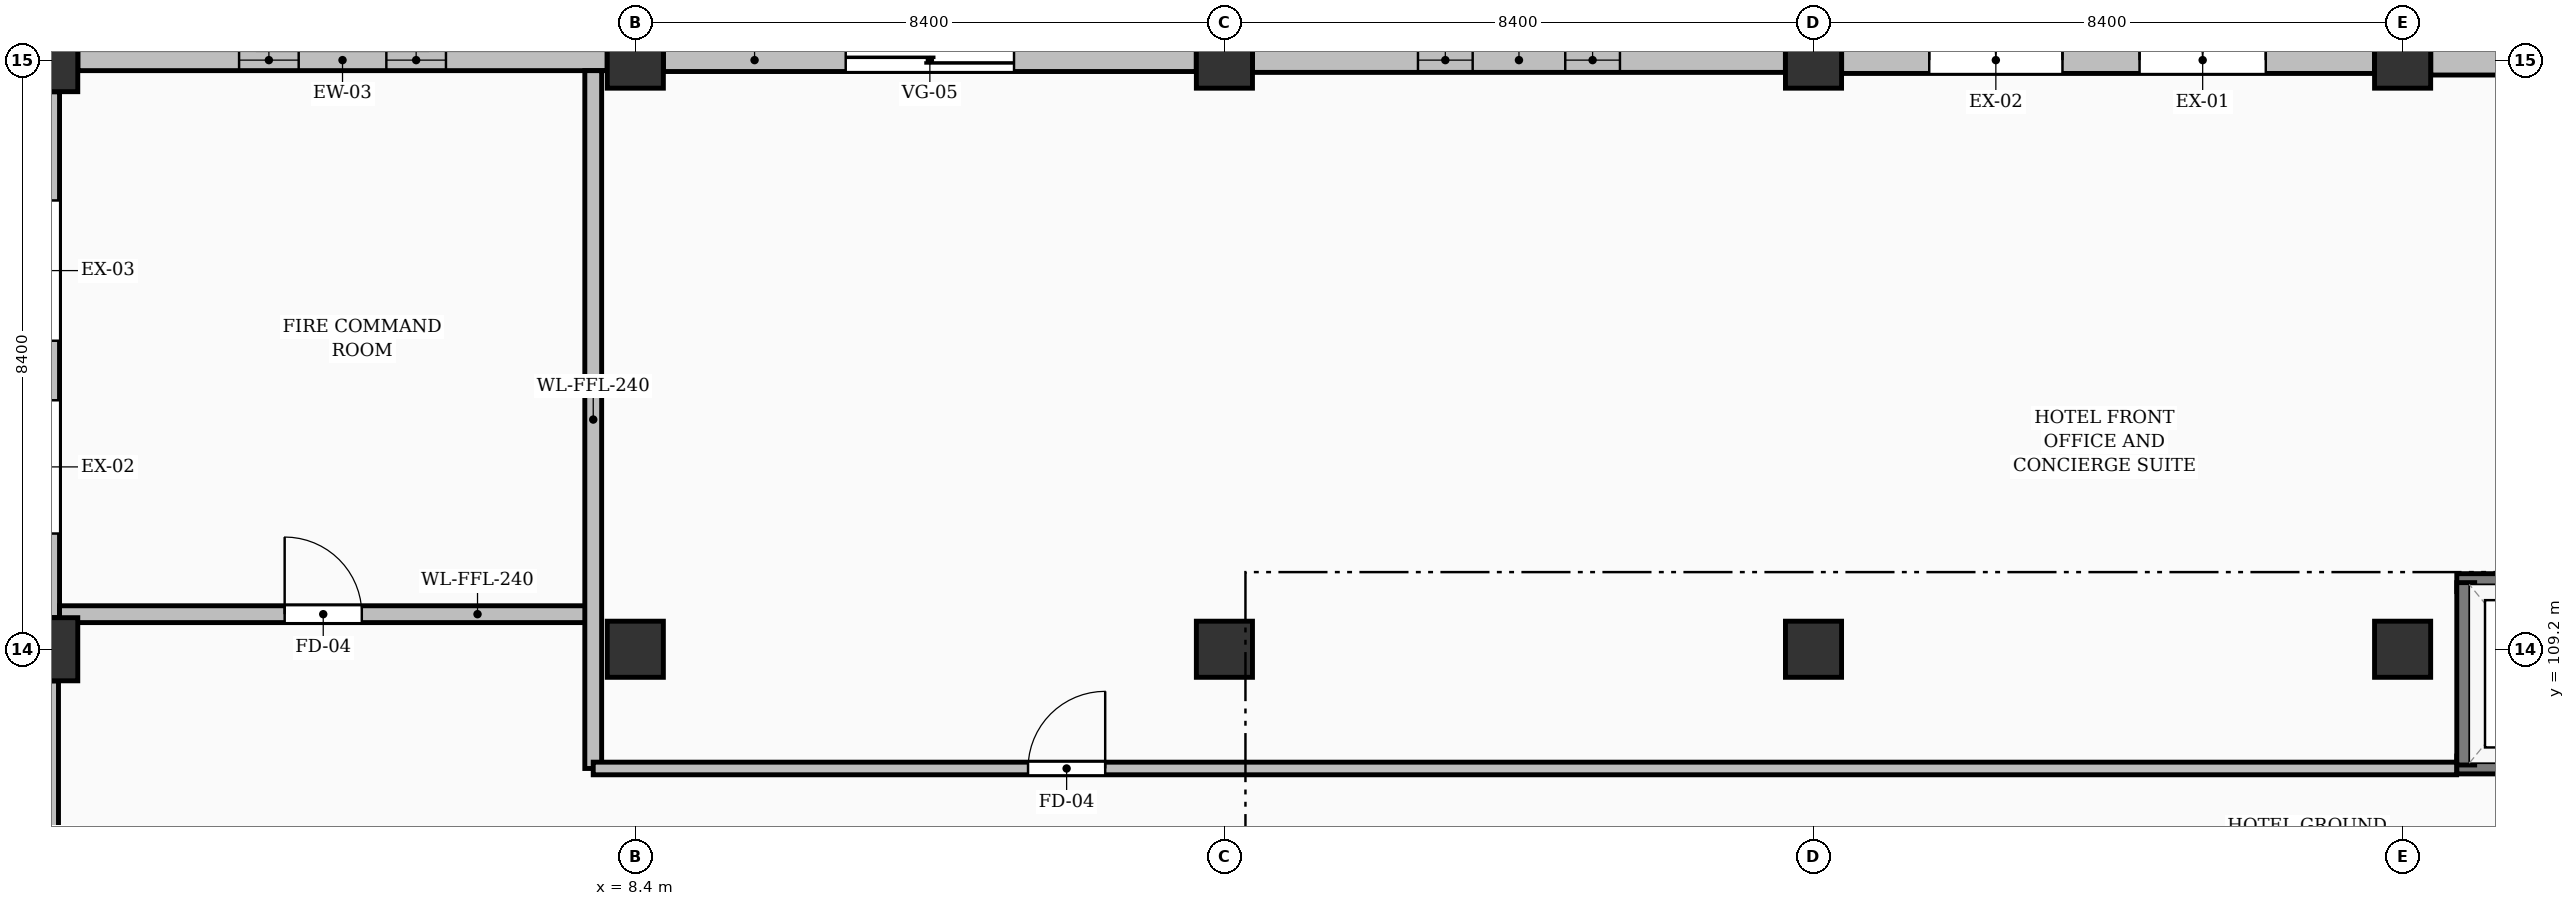
"""IFC4 building model, lengths in metres.
Left out: names, types, materials, properties, quantities, classifications, styles, units other than length and angle.
Written with IfcOpenShell. Run it as: python <this file> out.ifc"""

import sys

from ifc_helpers import new_model, si_unit, direction, frame, frame_2d, origin, origin_2d, place, context, subcontext, project, spatial, rectangle, extrude, element, fill, save


model = new_model("IFC4")
c1 = context("Model", 3, precision=1e-05, world=origin(), true_north=direction((0.0, 1.0)))
c2 = subcontext(c1, "Body", "Model", "MODEL_VIEW")
j1 = project(units=[si_unit("LENGTHUNIT", "METRE"), si_unit("PLANEANGLEUNIT", "RADIAN")], contexts=[c1])
p1 = place(None, origin())
s1 = spatial("IfcSite", under=j1, at=p1, CompositionType="ELEMENT")
p2 = place(p1, origin())
s2 = spatial("IfcBuilding", under=s1, at=p2, CompositionType="ELEMENT")
p3 = place(p2, origin())
s3 = spatial("IfcBuildingStorey", under=s2, at=p3, CompositionType="ELEMENT", Elevation=0.0)
for number, where, z_axis, x_axis in (
    (1, (0.0, 109.2, 0.0), (0.0, 0.0, 1.0), (1.0, 0.0, 0.0)),
    (2, (0.0, 117.6, 0.0), (0.0, 0.0, 1.0), (1.0, 0.0, 0.0)),
):
    element("IfcColumn", number, at=place(p3, frame(where, z_axis=z_axis, x_axis=x_axis)), inside=s3, PredefinedType="COLUMN", context=c2, shape_type="SweptSolid", body=[
        extrude(rectangle(XDim=0.9, YDim=0.9, at=origin_2d()), origin(), (0.0, 0.0, 1.0), 3.92),
    ])
for number, where, z_axis, x_axis in (
    (3, (8.4, 109.2, 0.0), (0.0, 0.0, 1.0), (1.0, 0.0, 0.0)),
    (4, (8.4, 117.6, 0.0), (0.0, 0.0, 1.0), (1.0, 0.0, 0.0)),
    (5, (16.8, 109.2, 0.0), (0.0, 0.0, 1.0), (1.0, 0.0, 0.0)),
    (6, (16.8, 117.6, 0.0), (0.0, 0.0, 1.0), (1.0, 0.0, 0.0)),
    (7, (25.2, 109.2, 0.0), (0.0, 0.0, 1.0), (1.0, 0.0, 0.0)),
    (8, (25.2, 117.6, 0.0), (0.0, 0.0, 1.0), (1.0, 0.0, 0.0)),
    (9, (33.6, 109.2, 0.0), (0.0, 0.0, 1.0), (1.0, 0.0, 0.0)),
    (10, (33.6, 117.6, 0.0), (0.0, 0.0, 1.0), (1.0, 0.0, 0.0)),
):
    element("IfcColumn", number, at=place(p3, frame(where, z_axis=z_axis, x_axis=x_axis)), inside=s3, PredefinedType="COLUMN", context=c2, shape_type="SweptSolid", body=[
        extrude(rectangle(XDim=0.8, YDim=0.8, at=origin_2d()), origin(), (0.0, 0.0, 1.0), 3.92),
    ])
p4 = place(p3, frame((0.451, 117.6, 0.0), z_axis=(0.0, 0.0, 1.0), x_axis=(1.0, 0.0, 0.0)))
e11 = element("IfcWall", 11, at=p4, inside=s3, PredefinedType="SOLIDWALL", context=c2, shape_type="SweptSolid", body=[
    extrude(rectangle(XDim=7.548, YDim=0.3, at=frame_2d((3.774, 0.0))), origin(), (0.0, 0.0, 1.0), 2.825),
])
p5 = place(p4, frame((2.299, 0.0, 0.3)))
e12 = element("IfcOpeningElement", 12, at=p5, cuts=e11, PredefinedType="OPENING", context=c2, shape_type="SweptSolid", body=[
    extrude(rectangle(XDim=0.85, YDim=1.9, at=frame_2d((0.425, 0.95))), frame((0.0, 0.16, 0.0), z_axis=(0.0, -1.0, 0.0), x_axis=(1.0, 0.0, 0.0)), (0.0, 0.0, 1.0), 0.32),
])
p6 = place(p4, frame((4.399, 0.0, 0.3)))
e13 = element("IfcOpeningElement", 13, at=p6, cuts=e11, PredefinedType="OPENING", context=c2, shape_type="SweptSolid", body=[
    extrude(rectangle(XDim=0.85, YDim=1.9, at=frame_2d((0.425, 0.95))), frame((0.0, 0.16, 0.0), z_axis=(0.0, -1.0, 0.0), x_axis=(1.0, 0.0, 0.0)), (0.0, 0.0, 1.0), 0.32),
])
p7 = place(p3, frame((8.801, 117.6, 0.0), z_axis=(0.0, 0.0, 1.0), x_axis=(1.0, 0.0, 0.0)))
e14 = element("IfcWall", 14, at=p7, inside=s3, PredefinedType="SOLIDWALL", context=c2, shape_type="SweptSolid", body=[
    extrude(rectangle(XDim=7.598, YDim=0.325, at=frame_2d((3.799, 0.0))), origin(), (0.0, 0.0, 1.0), 2.825),
])
p8 = place(p7, frame((2.599, 0.0, 0.0)))
e15 = element("IfcOpeningElement", 15, at=p8, cuts=e14, PredefinedType="OPENING", context=c2, shape_type="SweptSolid", body=[
    extrude(rectangle(XDim=2.4, YDim=2.25, at=frame_2d((1.2, 1.125))), frame((0.0, 0.172, 0.0), z_axis=(0.0, -1.0, 0.0), x_axis=(1.0, 0.0, 0.0)), (0.0, 0.0, 1.0), 0.345),
])
p9 = place(p3, frame((17.201, 117.6, 0.0), z_axis=(0.0, 0.0, 1.0), x_axis=(1.0, 0.0, 0.0)))
e16 = element("IfcWall", 16, at=p9, inside=s3, PredefinedType="SOLIDWALL", context=c2, shape_type="SweptSolid", body=[
    extrude(rectangle(XDim=7.598, YDim=0.35, at=frame_2d((3.799, 0.0))), origin(), (0.0, 0.0, 1.0), 2.825),
])
p10 = place(p9, frame((2.359, 0.0, 0.3)))
e17 = element("IfcOpeningElement", 17, at=p10, cuts=e16, PredefinedType="OPENING", context=c2, shape_type="SweptSolid", body=[
    extrude(rectangle(XDim=0.78, YDim=1.85, at=frame_2d((0.39, 0.925))), frame((0.0, 0.185, 0.0), z_axis=(0.0, -1.0, 0.0), x_axis=(1.0, 0.0, 0.0)), (0.0, 0.0, 1.0), 0.37),
])
p11 = place(p9, frame((4.459, 0.0, 0.3)))
e18 = element("IfcOpeningElement", 18, at=p11, cuts=e16, PredefinedType="OPENING", context=c2, shape_type="SweptSolid", body=[
    extrude(rectangle(XDim=0.78, YDim=1.85, at=frame_2d((0.39, 0.925))), frame((0.0, 0.185, 0.0), z_axis=(0.0, -1.0, 0.0), x_axis=(1.0, 0.0, 0.0)), (0.0, 0.0, 1.0), 0.37),
])
p12 = place(p3, frame((25.601, 117.6, 0.0), z_axis=(0.0, 0.0, 1.0), x_axis=(1.0, 0.0, 0.0)))
e19 = element("IfcWall", 19, at=p12, inside=s3, PredefinedType="SOLIDWALL", context=c2, shape_type="SweptSolid", body=[
    extrude(rectangle(XDim=7.598, YDim=0.38, at=frame_2d((3.799, 0.0))), origin(), (0.0, 0.0, 1.0), 2.825),
])
p13 = place(p12, frame((1.249, 0.0, 0.0)))
e20 = element("IfcOpeningElement", 20, at=p13, cuts=e19, PredefinedType="OPENING", context=c2, shape_type="SweptSolid", body=[
    extrude(rectangle(XDim=1.9, YDim=2.2, at=frame_2d((0.95, 1.1))), frame((0.0, 0.2, 0.0), z_axis=(0.0, -1.0, 0.0), x_axis=(1.0, 0.0, 0.0)), (0.0, 0.0, 1.0), 0.4),
])
p14 = place(p12, frame((4.248, 0.0, 0.0)))
e21 = element("IfcOpeningElement", 21, at=p14, cuts=e19, PredefinedType="OPENING", context=c2, shape_type="SweptSolid", body=[
    extrude(rectangle(XDim=1.8, YDim=2.2, at=frame_2d((0.9, 1.1))), frame((0.0, 0.2, 0.0), z_axis=(0.0, -1.0, 0.0), x_axis=(1.0, 0.0, 0.0)), (0.0, 0.0, 1.0), 0.4),
])
p15 = place(p3, frame((34.001, 117.6, 0.0), z_axis=(0.0, 0.0, 1.0), x_axis=(1.0, 0.0, 0.0)))
e22 = element("IfcWall", 22, at=p15, inside=s3, PredefinedType="SOLIDWALL", context=c2, shape_type="SweptSolid", body=[
    extrude(rectangle(XDim=7.598, YDim=0.425, at=frame_2d((3.799, 0.0))), origin(), (0.0, 0.0, 1.0), 2.825),
])
p16 = place(p15, frame((2.359, 0.0, 0.3)))
e23 = element("IfcOpeningElement", 23, at=p16, cuts=e22, PredefinedType="OPENING", context=c2, shape_type="SweptSolid", body=[
    extrude(rectangle(XDim=0.78, YDim=1.95, at=frame_2d((0.39, 0.975))), frame((0.0, 0.223, 0.0), z_axis=(0.0, -1.0, 0.0), x_axis=(1.0, 0.0, 0.0)), (0.0, 0.0, 1.0), 0.445),
])
p17 = place(p15, frame((4.459, 0.0, 0.3)))
e24 = element("IfcOpeningElement", 24, at=p17, cuts=e22, PredefinedType="OPENING", context=c2, shape_type="SweptSolid", body=[
    extrude(rectangle(XDim=0.78, YDim=1.95, at=frame_2d((0.39, 0.975))), frame((0.0, 0.223, 0.0), z_axis=(0.0, -1.0, 0.0), x_axis=(1.0, 0.0, 0.0)), (0.0, 0.0, 1.0), 0.445),
])
p18 = place(p3, frame((0.0, 101.251, 0.0), z_axis=(0.0, 0.0, 1.0), x_axis=(0.0, 1.0, 0.0)))
e25 = element("IfcWall", 25, at=p18, inside=s3, PredefinedType="SOLIDWALL", context=c2, shape_type="SweptSolid", body=[
    extrude(rectangle(XDim=7.498, YDim=0.35, at=frame_2d((3.749, 0.0))), origin(), (0.0, 0.0, 1.0), 2.975),
])
p19 = place(p18, frame((2.279, 0.0, 0.3)))
e26 = element("IfcOpeningElement", 26, at=p19, cuts=e25, PredefinedType="OPENING", context=c2, shape_type="SweptSolid", body=[
    extrude(rectangle(XDim=0.84, YDim=1.75, at=frame_2d((0.42, 0.875))), frame((0.0, 0.185, 0.0), z_axis=(0.0, -1.0, 0.0), x_axis=(1.0, 0.0, 0.0)), (0.0, 0.0, 1.0), 0.37),
])
p20 = place(p18, frame((4.379, 0.0, 0.3)))
e27 = element("IfcOpeningElement", 27, at=p20, cuts=e25, PredefinedType="OPENING", context=c2, shape_type="SweptSolid", body=[
    extrude(rectangle(XDim=0.84, YDim=1.75, at=frame_2d((0.42, 0.875))), frame((0.0, 0.185, 0.0), z_axis=(0.0, -1.0, 0.0), x_axis=(1.0, 0.0, 0.0)), (0.0, 0.0, 1.0), 0.37),
])
p21 = place(p3, frame((0.0, 109.651, 0.0), z_axis=(0.0, 0.0, 1.0), x_axis=(0.0, 1.0, 0.0)))
e28 = element("IfcWall", 28, at=p21, inside=s3, PredefinedType="SOLIDWALL", context=c2, shape_type="SweptSolid", body=[
    extrude(rectangle(XDim=7.498, YDim=0.38, at=frame_2d((3.749, 0.0))), origin(), (0.0, 0.0, 1.0), 2.775),
])
p22 = place(p21, frame((1.199, 0.0, 0.0)))
e29 = element("IfcOpeningElement", 29, at=p22, cuts=e28, PredefinedType="OPENING", context=c2, shape_type="SweptSolid", body=[
    extrude(rectangle(XDim=1.9, YDim=2.2, at=frame_2d((0.95, 1.1))), frame((0.0, 0.2, 0.0), z_axis=(0.0, -1.0, 0.0), x_axis=(1.0, 0.0, 0.0)), (0.0, 0.0, 1.0), 0.4),
])
p23 = place(p21, frame((3.948, 0.0, 0.0)))
e30 = element("IfcOpeningElement", 30, at=p23, cuts=e28, PredefinedType="OPENING", context=c2, shape_type="SweptSolid", body=[
    extrude(rectangle(XDim=2.0, YDim=2.3, at=frame_2d((1.0, 1.15))), frame((0.0, 0.2, 0.0), z_axis=(0.0, -1.0, 0.0), x_axis=(1.0, 0.0, 0.0)), (0.0, 0.0, 1.0), 0.4),
])
p24 = place(p3, frame((34.373, 107.55, 0.0), z_axis=(0.0, 0.0, 1.0), x_axis=(1.0, 0.0, 0.0)))
e31 = element("IfcWall", 31, at=p24, inside=s3, PredefinedType="SOLIDWALL", context=c2, shape_type="SweptSolid", body=[
    extrude(rectangle(XDim=2.455, YDim=0.255, at=frame_2d((1.228, 0.0))), origin(), (0.0, 0.0, 1.0), 3.64),
])
p25 = place(p24, frame((0.677, 0.0, 0.0)))
e32 = element("IfcOpeningElement", 32, at=p25, cuts=e31, PredefinedType="OPENING", context=c2, shape_type="SweptSolid", body=[
    extrude(rectangle(XDim=1.1, YDim=2.15, at=frame_2d((0.55, 1.075))), frame((0.0, 0.137, 0.0), z_axis=(0.0, -1.0, 0.0), x_axis=(1.0, 0.0, 0.0)), (0.0, 0.0, 1.0), 0.275),
])
p26 = place(p3, frame((34.373, 110.15, 0.0), z_axis=(0.0, 0.0, 1.0), x_axis=(1.0, 0.0, 0.0)))
e33 = element("IfcWall", 33, at=p26, inside=s3, PredefinedType="SOLIDWALL", context=c2, shape_type="SweptSolid", body=[
    extrude(rectangle(XDim=2.455, YDim=0.255, at=frame_2d((1.228, 0.0))), origin(), (0.0, 0.0, 1.0), 3.64),
])
p27 = place(p3, frame((34.5, 107.55, 0.0), z_axis=(0.0, 0.0, 1.0), x_axis=(0.0, 1.0, 0.0)))
e34 = element("IfcWall", 34, at=p27, inside=s3, PredefinedType="SOLIDWALL", context=c2, shape_type="SweptSolid", body=[
    extrude(rectangle(XDim=2.6, YDim=0.255, at=frame_2d((1.3, 0.0))), origin(), (0.0, 0.0, 1.0), 3.64),
])
p28 = place(p3, frame((0.19, 109.7, 0.0), z_axis=(0.0, 0.0, 1.0), x_axis=(1.0, 0.0, 0.0)))
e35 = element("IfcWall", 35, at=p28, inside=s3, PredefinedType="SOLIDWALL", context=c2, shape_type="SweptSolid", body=[
    extrude(rectangle(XDim=7.61, YDim=0.24, at=frame_2d((3.805, 0.0))), origin(), (0.0, 0.0, 1.0), 3.64),
])
p29 = place(p28, frame((3.21, 0.0, 0.0)))
e36 = element("IfcOpeningElement", 36, at=p29, cuts=e35, PredefinedType="OPENING", context=c2, shape_type="SweptSolid", body=[
    extrude(rectangle(XDim=1.1, YDim=2.1, at=frame_2d((0.55, 1.05))), frame((0.0, 0.13, 0.0), z_axis=(0.0, -1.0, 0.0), x_axis=(1.0, 0.0, 0.0)), (0.0, 0.0, 1.0), 0.26),
])
p30 = place(p3, frame((7.8, 107.5, 0.0), z_axis=(0.0, 0.0, 1.0), x_axis=(0.0, 1.0, 0.0)))
e37 = element("IfcWall", 37, at=p30, inside=s3, PredefinedType="SOLIDWALL", context=c2, shape_type="SweptSolid", body=[
    extrude(rectangle(XDim=9.95, YDim=0.24, at=frame_2d((4.975, 0.0))), origin(), (0.0, 0.0, 1.0), 3.64),
])
p31 = place(p3, frame((7.8, 107.5, 0.0), z_axis=(0.0, 0.0, 1.0), x_axis=(1.0, 0.0, 0.0)))
e38 = element("IfcWall", 38, at=p31, inside=s3, PredefinedType="PARTITIONING", context=c2, shape_type="SweptSolid", body=[
    extrude(rectangle(XDim=26.57, YDim=0.18, at=frame_2d((13.285, 0.0))), origin(), (0.0, 0.0, 1.0), 3.64),
])
p32 = place(p31, frame((6.2, 0.0, 0.0)))
e39 = element("IfcOpeningElement", 39, at=p32, cuts=e38, PredefinedType="OPENING", context=c2, shape_type="SweptSolid", body=[
    extrude(rectangle(XDim=1.1, YDim=2.1, at=frame_2d((0.55, 1.05))), frame((0.0, 0.1, 0.0), z_axis=(0.0, -1.0, 0.0), x_axis=(1.0, 0.0, 0.0)), (0.0, 0.0, 1.0), 0.2),
])
p33 = place(p5, origin())
e40 = element("IfcWindow", 40, at=p33, inside=s3, PartitioningType="SINGLE_PANEL", PredefinedType="WINDOW", context=c2, shape_type="SweptSolid", body=[
    extrude(rectangle(XDim=0.85, YDim=1.9, at=frame_2d((0.425, 0.95))), frame((0.0, 0.03, 0.0), z_axis=(0.0, -1.0, 0.0), x_axis=(1.0, 0.0, 0.0)), (0.0, 0.0, 1.0), 0.06),
])
fill(e12, e40)
p34 = place(p6, origin())
e41 = element("IfcWindow", 41, at=p34, inside=s3, PartitioningType="SINGLE_PANEL", PredefinedType="WINDOW", context=c2, shape_type="SweptSolid", body=[
    extrude(rectangle(XDim=0.85, YDim=1.9, at=frame_2d((0.425, 0.95))), frame((0.0, 0.03, 0.0), z_axis=(0.0, -1.0, 0.0), x_axis=(1.0, 0.0, 0.0)), (0.0, 0.0, 1.0), 0.06),
])
fill(e13, e41)
p35 = place(p8, origin())
e42 = element("IfcDoor", 42, at=p35, inside=s3, OperationType="DOUBLE_DOOR_SINGLE_SWING", PredefinedType="GATE", context=c2, shape_type="SweptSolid", body=[
    extrude(rectangle(XDim=2.4, YDim=2.25, at=frame_2d((1.2, 1.125))), frame((0.0, 0.025, 0.0), z_axis=(0.0, -1.0, 0.0), x_axis=(1.0, 0.0, 0.0)), (0.0, 0.0, 1.0), 0.05),
])
fill(e15, e42)
p36 = place(p10, origin())
e43 = element("IfcWindow", 43, at=p36, inside=s3, PartitioningType="SINGLE_PANEL", PredefinedType="WINDOW", context=c2, shape_type="SweptSolid", body=[
    extrude(rectangle(XDim=0.78, YDim=1.85, at=frame_2d((0.39, 0.925))), frame((0.0, 0.03, 0.0), z_axis=(0.0, -1.0, 0.0), x_axis=(1.0, 0.0, 0.0)), (0.0, 0.0, 1.0), 0.06),
])
fill(e17, e43)
p37 = place(p11, origin())
e44 = element("IfcWindow", 44, at=p37, inside=s3, PartitioningType="SINGLE_PANEL", PredefinedType="WINDOW", context=c2, shape_type="SweptSolid", body=[
    extrude(rectangle(XDim=0.78, YDim=1.85, at=frame_2d((0.39, 0.925))), frame((0.0, 0.03, 0.0), z_axis=(0.0, -1.0, 0.0), x_axis=(1.0, 0.0, 0.0)), (0.0, 0.0, 1.0), 0.06),
])
fill(e18, e44)
p38 = place(p13, origin())
e45 = element("IfcDoor", 45, at=p38, inside=s3, OperationType="DOUBLE_DOOR_SINGLE_SWING", PredefinedType="DOOR", context=c2, shape_type="SweptSolid", body=[
    extrude(rectangle(XDim=1.9, YDim=2.2, at=frame_2d((0.95, 1.1))), frame((0.0, 0.025, 0.0), z_axis=(0.0, -1.0, 0.0), x_axis=(1.0, 0.0, 0.0)), (0.0, 0.0, 1.0), 0.05),
])
fill(e20, e45)
p39 = place(p14, origin())
e46 = element("IfcDoor", 46, at=p39, inside=s3, OperationType="DOUBLE_DOOR_SINGLE_SWING", PredefinedType="DOOR", context=c2, shape_type="SweptSolid", body=[
    extrude(rectangle(XDim=1.8, YDim=2.2, at=frame_2d((0.9, 1.1))), frame((0.0, 0.025, 0.0), z_axis=(0.0, -1.0, 0.0), x_axis=(1.0, 0.0, 0.0)), (0.0, 0.0, 1.0), 0.05),
])
fill(e21, e46)
p40 = place(p29, origin())
e47 = element("IfcDoor", 47, at=p40, inside=s3, OperationType="SINGLE_SWING_LEFT", PredefinedType="DOOR", context=c2, shape_type="SweptSolid", body=[
    extrude(rectangle(XDim=1.1, YDim=2.1, at=frame_2d((0.55, 1.05))), frame((0.0, 0.025, 0.0), z_axis=(0.0, -1.0, 0.0), x_axis=(1.0, 0.0, 0.0)), (0.0, 0.0, 1.0), 0.05),
])
fill(e36, e47)
p41 = place(p32, origin())
e48 = element("IfcDoor", 48, at=p41, inside=s3, OperationType="SINGLE_SWING_RIGHT", PredefinedType="DOOR", context=c2, shape_type="SweptSolid", body=[
    extrude(rectangle(XDim=1.1, YDim=2.1, at=frame_2d((0.55, 1.05))), frame((0.0, 0.025, 0.0), z_axis=(0.0, -1.0, 0.0), x_axis=(1.0, 0.0, 0.0)), (0.0, 0.0, 1.0), 0.05),
])
fill(e39, e48)
save(model, sys.argv[1])
